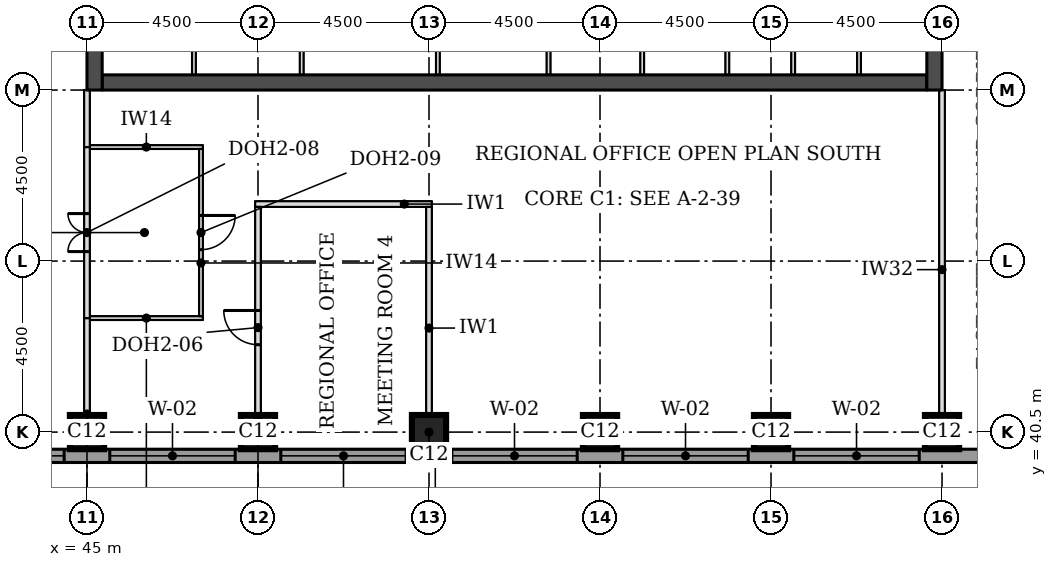
"""IFC4 building model, lengths in metres.
Left out: names, types, materials, properties, quantities, classifications, styles, units other than length and angle.
Written with IfcOpenShell. Run it as: python <this file> out.ifc"""

import sys

from ifc_helpers import new_model, si_unit, direction, frame, frame_2d, origin, origin_2d, place, context, subcontext, project, spatial, rectangle, extrude, element, fill, save


model = new_model("IFC4")
c1 = context("Model", 3, precision=1e-05, world=origin(), true_north=direction((0.0, 1.0)))
c2 = subcontext(c1, "Body", "Model", "MODEL_VIEW")
j1 = project(units=[si_unit("LENGTHUNIT", "METRE"), si_unit("PLANEANGLEUNIT", "RADIAN")], contexts=[c1])
p1 = place(None, origin())
s1 = spatial("IfcSite", under=j1, at=p1, CompositionType="ELEMENT")
p2 = place(p1, origin())
s2 = spatial("IfcBuilding", under=s1, at=p2, CompositionType="ELEMENT")
p3 = place(p2, frame((0.0, 0.0, 158.8)))
s3 = spatial("IfcBuildingStorey", under=s2, at=p3, CompositionType="ELEMENT", Elevation=158.8)
for number, where, z_axis, x_axis in (
    (1, (45.0, 40.5, 0.0), (0.0, 0.0, 1.0), (1.0, 0.0, 0.0)),
    (2, (49.5, 40.5, 0.0), (0.0, 0.0, 1.0), (1.0, 0.0, 0.0)),
    (3, (54.0, 40.5, 0.0), (0.0, 0.0, 1.0), (1.0, 0.0, 0.0)),
    (4, (58.5, 40.5, 0.0), (0.0, 0.0, 1.0), (1.0, 0.0, 0.0)),
    (5, (63.0, 40.5, 0.0), (0.0, 0.0, 1.0), (1.0, 0.0, 0.0)),
    (6, (67.5, 40.5, 0.0), (0.0, 0.0, 1.0), (1.0, 0.0, 0.0)),
):
    element("IfcColumn", number, at=place(p3, frame(where, z_axis=z_axis, x_axis=x_axis)), inside=s3, PredefinedType="COLUMN", context=c2, shape_type="SweptSolid", body=[
        extrude(rectangle(XDim=0.9, YDim=0.9, at=origin_2d()), origin(), (0.0, 0.0, 1.0), 3.7),
    ])
p4 = place(p3, frame((45.4, 49.7, 0.0), z_axis=(0.0, 0.0, 1.0), x_axis=(1.0, 0.0, 0.0)))
e7 = element("IfcWall", 7, at=p4, inside=s3, PredefinedType="SHEAR", context=c2, shape_type="SweptSolid", body=[
    extrude(rectangle(XDim=21.7, YDim=0.4, at=frame_2d((10.85, 0.0))), origin(), (0.0, 0.0, 1.0), 3.7),
])
p5 = place(p3, frame((45.2, 49.5, 0.0), z_axis=(0.0, 0.0, 1.0), x_axis=(0.0, 1.0, 0.0)))
e8 = element("IfcWall", 8, at=p5, inside=s3, PredefinedType="SHEAR", context=c2, shape_type="SweptSolid", body=[
    extrude(rectangle(XDim=22.5, YDim=0.4, at=frame_2d((11.25, 0.0))), origin(), (0.0, 0.0, 1.0), 3.7),
])
p6 = place(p5, frame((4.2, 0.0, 0.0)))
e9 = element("IfcOpeningElement", 9, at=p6, cuts=e8, PredefinedType="OPENING", context=c2, shape_type="SweptSolid", body=[
    extrude(rectangle(XDim=1.8, YDim=2.1, at=frame_2d((0.9, 1.05))), frame((0.0, 0.21, 0.0), z_axis=(0.0, -1.0, 0.0), x_axis=(1.0, 0.0, 0.0)), (0.0, 0.0, 1.0), 0.42),
])
p7 = place(p5, frame((6.9, 0.0, 0.0)))
e10 = element("IfcOpeningElement", 10, at=p7, cuts=e8, PredefinedType="OPENING", context=c2, shape_type="SweptSolid", body=[
    extrude(rectangle(XDim=1.1, YDim=2.1, at=frame_2d((0.55, 1.05))), frame((0.0, 0.21, 0.0), z_axis=(0.0, -1.0, 0.0), x_axis=(1.0, 0.0, 0.0)), (0.0, 0.0, 1.0), 0.42),
])
p8 = place(p5, frame((13.6, 0.0, 0.0)))
e11 = element("IfcOpeningElement", 11, at=p8, cuts=e8, PredefinedType="OPENING", context=c2, shape_type="SweptSolid", body=[
    extrude(rectangle(XDim=1.1, YDim=2.1, at=frame_2d((0.55, 1.05))), frame((0.0, 0.21, 0.0), z_axis=(0.0, -1.0, 0.0), x_axis=(1.0, 0.0, 0.0)), (0.0, 0.0, 1.0), 0.42),
])
p9 = place(p5, frame((16.5, 0.0, 0.0)))
e12 = element("IfcOpeningElement", 12, at=p9, cuts=e8, PredefinedType="OPENING", context=c2, shape_type="SweptSolid", body=[
    extrude(rectangle(XDim=1.8, YDim=2.1, at=frame_2d((0.9, 1.05))), frame((0.0, 0.21, 0.0), z_axis=(0.0, -1.0, 0.0), x_axis=(1.0, 0.0, 0.0)), (0.0, 0.0, 1.0), 0.42),
])
p10 = place(p3, frame((67.3, 49.5, 0.0), z_axis=(0.0, 0.0, 1.0), x_axis=(0.0, 1.0, 0.0)))
e13 = element("IfcWall", 13, at=p10, inside=s3, PredefinedType="SHEAR", context=c2, shape_type="SweptSolid", body=[
    extrude(rectangle(XDim=22.5, YDim=0.4, at=frame_2d((11.25, 0.0))), origin(), (0.0, 0.0, 1.0), 3.7),
])
p11 = place(p10, frame((4.2, 0.0, 0.0)))
e14 = element("IfcOpeningElement", 14, at=p11, cuts=e13, PredefinedType="OPENING", context=c2, shape_type="SweptSolid", body=[
    extrude(rectangle(XDim=1.8, YDim=2.1, at=frame_2d((0.9, 1.05))), frame((0.0, 0.21, 0.0), z_axis=(0.0, -1.0, 0.0), x_axis=(1.0, 0.0, 0.0)), (0.0, 0.0, 1.0), 0.42),
])
p12 = place(p10, frame((6.9, 0.0, 0.0)))
e15 = element("IfcOpeningElement", 15, at=p12, cuts=e13, PredefinedType="OPENING", context=c2, shape_type="SweptSolid", body=[
    extrude(rectangle(XDim=1.1, YDim=2.1, at=frame_2d((0.55, 1.05))), frame((0.0, 0.21, 0.0), z_axis=(0.0, -1.0, 0.0), x_axis=(1.0, 0.0, 0.0)), (0.0, 0.0, 1.0), 0.42),
])
p13 = place(p10, frame((13.6, 0.0, 0.0)))
e16 = element("IfcOpeningElement", 16, at=p13, cuts=e13, PredefinedType="OPENING", context=c2, shape_type="SweptSolid", body=[
    extrude(rectangle(XDim=1.1, YDim=2.1, at=frame_2d((0.55, 1.05))), frame((0.0, 0.21, 0.0), z_axis=(0.0, -1.0, 0.0), x_axis=(1.0, 0.0, 0.0)), (0.0, 0.0, 1.0), 0.42),
])
p14 = place(p10, frame((16.5, 0.0, 0.0)))
e17 = element("IfcOpeningElement", 17, at=p14, cuts=e13, PredefinedType="OPENING", context=c2, shape_type="SweptSolid", body=[
    extrude(rectangle(XDim=1.8, YDim=2.1, at=frame_2d((0.9, 1.05))), frame((0.0, 0.21, 0.0), z_axis=(0.0, -1.0, 0.0), x_axis=(1.0, 0.0, 0.0)), (0.0, 0.0, 1.0), 0.42),
])
p15 = place(p3, frame((36.0, 39.875, 0.0), z_axis=(0.0, 0.0, 1.0), x_axis=(1.0, 0.0, 0.0)))
e18 = element("IfcWall", 18, at=p15, inside=s3, PredefinedType="STANDARD", context=c2, shape_type="SweptSolid", body=[
    extrude(rectangle(XDim=36.331, YDim=0.35, at=frame_2d((18.166, 0.0))), origin(), (0.0, 0.0, 1.0), 3.525),
])
p16 = place(p15, frame((5.1, 0.0, 0.9)))
e19 = element("IfcOpeningElement", 19, at=p16, cuts=e18, PredefinedType="OPENING", context=c2, shape_type="SweptSolid", body=[
    extrude(rectangle(XDim=3.3, YDim=1.9, at=frame_2d((1.65, 0.95))), frame((0.0, 0.185, 0.0), z_axis=(0.0, -1.0, 0.0), x_axis=(1.0, 0.0, 0.0)), (0.0, 0.0, 1.0), 0.37),
])
p17 = place(p15, frame((9.6, 0.0, 0.9)))
e20 = element("IfcOpeningElement", 20, at=p17, cuts=e18, PredefinedType="OPENING", context=c2, shape_type="SweptSolid", body=[
    extrude(rectangle(XDim=3.3, YDim=1.9, at=frame_2d((1.65, 0.95))), frame((0.0, 0.185, 0.0), z_axis=(0.0, -1.0, 0.0), x_axis=(1.0, 0.0, 0.0)), (0.0, 0.0, 1.0), 0.37),
])
p18 = place(p15, frame((14.1, 0.0, 0.9)))
e21 = element("IfcOpeningElement", 21, at=p18, cuts=e18, PredefinedType="OPENING", context=c2, shape_type="SweptSolid", body=[
    extrude(rectangle(XDim=3.3, YDim=1.9, at=frame_2d((1.65, 0.95))), frame((0.0, 0.185, 0.0), z_axis=(0.0, -1.0, 0.0), x_axis=(1.0, 0.0, 0.0)), (0.0, 0.0, 1.0), 0.37),
])
p19 = place(p15, frame((18.6, 0.0, 0.9)))
e22 = element("IfcOpeningElement", 22, at=p19, cuts=e18, PredefinedType="OPENING", context=c2, shape_type="SweptSolid", body=[
    extrude(rectangle(XDim=3.3, YDim=1.9, at=frame_2d((1.65, 0.95))), frame((0.0, 0.185, 0.0), z_axis=(0.0, -1.0, 0.0), x_axis=(1.0, 0.0, 0.0)), (0.0, 0.0, 1.0), 0.37),
])
p20 = place(p15, frame((23.1, 0.0, 0.9)))
e23 = element("IfcOpeningElement", 23, at=p20, cuts=e18, PredefinedType="OPENING", context=c2, shape_type="SweptSolid", body=[
    extrude(rectangle(XDim=3.3, YDim=1.9, at=frame_2d((1.65, 0.95))), frame((0.0, 0.185, 0.0), z_axis=(0.0, -1.0, 0.0), x_axis=(1.0, 0.0, 0.0)), (0.0, 0.0, 1.0), 0.37),
])
p21 = place(p15, frame((27.6, 0.0, 0.9)))
e24 = element("IfcOpeningElement", 24, at=p21, cuts=e18, PredefinedType="OPENING", context=c2, shape_type="SweptSolid", body=[
    extrude(rectangle(XDim=3.3, YDim=1.9, at=frame_2d((1.65, 0.95))), frame((0.0, 0.185, 0.0), z_axis=(0.0, -1.0, 0.0), x_axis=(1.0, 0.0, 0.0)), (0.0, 0.0, 1.0), 0.37),
])
p22 = place(p3, frame((45.075, 43.5, 0.0), z_axis=(0.0, 0.0, 1.0), x_axis=(1.0, 0.0, 0.0)))
e25 = element("IfcWall", 25, at=p22, inside=s3, PredefinedType="PARTITIONING", context=c2, shape_type="SweptSolid", body=[
    extrude(rectangle(XDim=2.975, YDim=0.1, at=frame_2d((1.488, 0.0))), origin(), (0.0, 0.0, 1.0), 3.55),
])
p23 = place(p3, frame((49.425, 46.5, 0.0), z_axis=(0.0, 0.0, 1.0), x_axis=(1.0, 0.0, 0.0)))
e26 = element("IfcWall", 26, at=p23, inside=s3, PredefinedType="PARTITIONING", context=c2, shape_type="SweptSolid", body=[
    extrude(rectangle(XDim=4.65, YDim=0.15, at=frame_2d((2.325, 0.0))), origin(), (0.0, 0.0, 1.0), 3.55),
])
p24 = place(p3, frame((45.075, 48.0, 0.0), z_axis=(0.0, 0.0, 1.0), x_axis=(1.0, 0.0, 0.0)))
e27 = element("IfcWall", 27, at=p24, inside=s3, PredefinedType="PARTITIONING", context=c2, shape_type="SweptSolid", body=[
    extrude(rectangle(XDim=2.975, YDim=0.1, at=frame_2d((1.488, 0.0))), origin(), (0.0, 0.0, 1.0), 3.55),
])
p25 = place(p3, frame((45.0, 40.05, 0.0), z_axis=(0.0, 0.0, 1.0), x_axis=(0.0, 1.0, 0.0)))
e28 = element("IfcWall", 28, at=p25, inside=s3, PredefinedType="PARTITIONING", context=c2, shape_type="SweptSolid", body=[
    extrude(rectangle(XDim=3.45, YDim=0.15, at=frame_2d((1.725, 0.0))), origin(), (0.0, 0.0, 1.0), 3.022),
])
p26 = place(p3, frame((49.5, 40.05, 0.0), z_axis=(0.0, 0.0, 1.0), x_axis=(0.0, 1.0, 0.0)))
e29 = element("IfcWall", 29, at=p26, inside=s3, PredefinedType="PARTITIONING", context=c2, shape_type="SweptSolid", body=[
    extrude(rectangle(XDim=6.375, YDim=0.15, at=frame_2d((3.188, 0.0))), origin(), (0.0, 0.0, 1.0), 3.55),
])
p27 = place(p26, frame((2.75, 0.0, 0.0)))
e30 = element("IfcOpeningElement", 30, at=p27, cuts=e29, PredefinedType="OPENING", context=c2, shape_type="SweptSolid", body=[
    extrude(rectangle(XDim=0.9, YDim=2.1, at=frame_2d((0.45, 1.05))), frame((0.0, 0.085, 0.0), z_axis=(0.0, -1.0, 0.0), x_axis=(1.0, 0.0, 0.0)), (0.0, 0.0, 1.0), 0.17),
])
p28 = place(p3, frame((54.0, 40.05, 0.0), z_axis=(0.0, 0.0, 1.0), x_axis=(0.0, 1.0, 0.0)))
e31 = element("IfcWall", 31, at=p28, inside=s3, PredefinedType="PARTITIONING", context=c2, shape_type="SweptSolid", body=[
    extrude(rectangle(XDim=6.375, YDim=0.15, at=frame_2d((3.188, 0.0))), origin(), (0.0, 0.0, 1.0), 3.55),
])
p29 = place(p3, frame((67.5, 40.05, 0.0), z_axis=(0.0, 0.0, 1.0), x_axis=(0.0, 1.0, 0.0)))
e32 = element("IfcWall", 32, at=p29, inside=s3, PredefinedType="PARTITIONING", context=c2, shape_type="SweptSolid", body=[
    extrude(rectangle(XDim=9.45, YDim=0.15, at=frame_2d((4.725, 0.0))), origin(), (0.0, 0.0, 1.0), 3.022),
])
p30 = place(p3, frame((45.0, 43.5, 0.0), z_axis=(0.0, 0.0, 1.0), x_axis=(0.0, 1.0, 0.0)))
e33 = element("IfcWall", 33, at=p30, inside=s3, PredefinedType="PARTITIONING", context=c2, shape_type="SweptSolid", body=[
    extrude(rectangle(XDim=4.5, YDim=0.15, at=frame_2d((2.25, 0.0))), origin(), (0.0, 0.0, 1.0), 3.022),
])
p31 = place(p30, frame((1.75, 0.0, 0.0)))
e34 = element("IfcOpeningElement", 34, at=p31, cuts=e33, PredefinedType="OPENING", context=c2, shape_type="SweptSolid", body=[
    extrude(rectangle(XDim=1.0, YDim=2.1, at=frame_2d((0.5, 1.05))), frame((0.0, 0.085, 0.0), z_axis=(0.0, -1.0, 0.0), x_axis=(1.0, 0.0, 0.0)), (0.0, 0.0, 1.0), 0.17),
])
p32 = place(p3, frame((48.0, 43.55, 0.0), z_axis=(0.0, 0.0, 1.0), x_axis=(0.0, 1.0, 0.0)))
e35 = element("IfcWall", 35, at=p32, inside=s3, PredefinedType="PARTITIONING", context=c2, shape_type="SweptSolid", body=[
    extrude(rectangle(XDim=4.4, YDim=0.1, at=frame_2d((2.2, 0.0))), origin(), (0.0, 0.0, 1.0), 3.55),
])
p33 = place(p32, frame((1.75, 0.0, 0.0)))
e36 = element("IfcOpeningElement", 36, at=p33, cuts=e35, PredefinedType="OPENING", context=c2, shape_type="SweptSolid", body=[
    extrude(rectangle(XDim=0.9, YDim=2.1, at=frame_2d((0.45, 1.05))), frame((0.0, 0.06, 0.0), z_axis=(0.0, -1.0, 0.0), x_axis=(1.0, 0.0, 0.0)), (0.0, 0.0, 1.0), 0.12),
])
p34 = place(p3, frame((45.0, 48.0, 0.0), z_axis=(0.0, 0.0, 1.0), x_axis=(0.0, 1.0, 0.0)))
e37 = element("IfcWall", 37, at=p34, inside=s3, PredefinedType="PARTITIONING", context=c2, shape_type="SweptSolid", body=[
    extrude(rectangle(XDim=1.5, YDim=0.15, at=frame_2d((0.75, 0.0))), origin(), (0.0, 0.0, 1.0), 3.022),
])
for number, where, z_axis, x_axis in (
    (38, (47.815, 49.9, 0.0), (0.0, 0.0, 1.0), (0.0, 1.0, 0.0)),
    (39, (50.65, 49.9, 0.0), (0.0, 0.0, 1.0), (0.0, 1.0, 0.0)),
    (40, (54.234, 49.9, 0.0), (0.0, 0.0, 1.0), (0.0, 1.0, 0.0)),
    (41, (57.146, 49.9, 0.0), (0.0, 0.0, 1.0), (0.0, 1.0, 0.0)),
    (42, (59.61, 49.9, 0.0), (0.0, 0.0, 1.0), (0.0, 1.0, 0.0)),
    (43, (61.85, 49.9, 0.0), (0.0, 0.0, 1.0), (0.0, 1.0, 0.0)),
    (44, (63.583, 49.9, 0.0), (0.0, 0.0, 1.0), (0.0, 1.0, 0.0)),
    (45, (65.315, 49.9, 0.0), (0.0, 0.0, 1.0), (0.0, 1.0, 0.0)),
):
    element("IfcWall", number, at=place(p3, frame(where, z_axis=z_axis, x_axis=x_axis)), inside=s3, PredefinedType="PARTITIONING", context=c2, shape_type="SweptSolid", body=[
        extrude(rectangle(XDim=3.1, YDim=0.1, at=frame_2d((1.55, 0.0))), origin(), (0.0, 0.0, 1.0), 3.55),
    ])
p35 = place(p16, origin())
e46 = element("IfcWindow", 46, at=p35, inside=s3, PartitioningType="SINGLE_PANEL", PredefinedType="WINDOW", context=c2, shape_type="SweptSolid", body=[
    extrude(rectangle(XDim=3.3, YDim=1.9, at=frame_2d((1.65, 0.95))), frame((0.0, 0.085, 0.0), z_axis=(0.0, -1.0, 0.0), x_axis=(1.0, 0.0, 0.0)), (0.0, 0.0, 1.0), 0.06),
])
fill(e19, e46)
p36 = place(p17, origin())
e47 = element("IfcWindow", 47, at=p36, inside=s3, PartitioningType="SINGLE_PANEL", PredefinedType="WINDOW", context=c2, shape_type="SweptSolid", body=[
    extrude(rectangle(XDim=3.3, YDim=1.9, at=frame_2d((1.65, 0.95))), frame((0.0, 0.085, 0.0), z_axis=(0.0, -1.0, 0.0), x_axis=(1.0, 0.0, 0.0)), (0.0, 0.0, 1.0), 0.06),
])
fill(e20, e47)
p37 = place(p18, origin())
e48 = element("IfcWindow", 48, at=p37, inside=s3, PartitioningType="SINGLE_PANEL", PredefinedType="WINDOW", context=c2, shape_type="SweptSolid", body=[
    extrude(rectangle(XDim=3.3, YDim=1.9, at=frame_2d((1.65, 0.95))), frame((0.0, 0.085, 0.0), z_axis=(0.0, -1.0, 0.0), x_axis=(1.0, 0.0, 0.0)), (0.0, 0.0, 1.0), 0.06),
])
fill(e21, e48)
p38 = place(p19, origin())
e49 = element("IfcWindow", 49, at=p38, inside=s3, PartitioningType="SINGLE_PANEL", PredefinedType="WINDOW", context=c2, shape_type="SweptSolid", body=[
    extrude(rectangle(XDim=3.3, YDim=1.9, at=frame_2d((1.65, 0.95))), frame((0.0, 0.085, 0.0), z_axis=(0.0, -1.0, 0.0), x_axis=(1.0, 0.0, 0.0)), (0.0, 0.0, 1.0), 0.06),
])
fill(e22, e49)
p39 = place(p20, origin())
e50 = element("IfcWindow", 50, at=p39, inside=s3, PartitioningType="SINGLE_PANEL", PredefinedType="WINDOW", context=c2, shape_type="SweptSolid", body=[
    extrude(rectangle(XDim=3.3, YDim=1.9, at=frame_2d((1.65, 0.95))), frame((0.0, 0.085, 0.0), z_axis=(0.0, -1.0, 0.0), x_axis=(1.0, 0.0, 0.0)), (0.0, 0.0, 1.0), 0.06),
])
fill(e23, e50)
p40 = place(p21, origin())
e51 = element("IfcWindow", 51, at=p40, inside=s3, PartitioningType="SINGLE_PANEL", PredefinedType="WINDOW", context=c2, shape_type="SweptSolid", body=[
    extrude(rectangle(XDim=3.3, YDim=1.9, at=frame_2d((1.65, 0.95))), frame((0.0, 0.085, 0.0), z_axis=(0.0, -1.0, 0.0), x_axis=(1.0, 0.0, 0.0)), (0.0, 0.0, 1.0), 0.06),
])
fill(e24, e51)
p41 = place(p31, origin())
e52 = element("IfcDoor", 52, at=p41, inside=s3, OperationType="DOUBLE_DOOR_SINGLE_SWING", PredefinedType="DOOR", context=c2, shape_type="SweptSolid", body=[
    extrude(rectangle(XDim=1.0, YDim=2.1, at=frame_2d((0.5, 1.05))), frame((0.0, 0.025, 0.0), z_axis=(0.0, -1.0, 0.0), x_axis=(1.0, 0.0, 0.0)), (0.0, 0.0, 1.0), 0.05),
])
fill(e34, e52)
p42 = place(p33, frame((0.9, 0.0, 0.0), z_axis=(0.0, 0.0, 1.0), x_axis=(-1.0, 0.0, 0.0)))
e53 = element("IfcDoor", 53, at=p42, inside=s3, OperationType="SINGLE_SWING_LEFT", PredefinedType="DOOR", context=c2, shape_type="SweptSolid", body=[
    extrude(rectangle(XDim=0.9, YDim=2.1, at=frame_2d((0.45, 1.05))), frame((0.0, 0.025, 0.0), z_axis=(0.0, -1.0, 0.0), x_axis=(1.0, 0.0, 0.0)), (0.0, 0.0, 1.0), 0.05),
])
fill(e36, e53)
p43 = place(p27, origin())
e54 = element("IfcDoor", 54, at=p43, inside=s3, OperationType="SINGLE_SWING_RIGHT", PredefinedType="DOOR", context=c2, shape_type="SweptSolid", body=[
    extrude(rectangle(XDim=0.9, YDim=2.1, at=frame_2d((0.45, 1.05))), frame((0.0, 0.025, 0.0), z_axis=(0.0, -1.0, 0.0), x_axis=(1.0, 0.0, 0.0)), (0.0, 0.0, 1.0), 0.05),
])
fill(e30, e54)
save(model, sys.argv[1])
